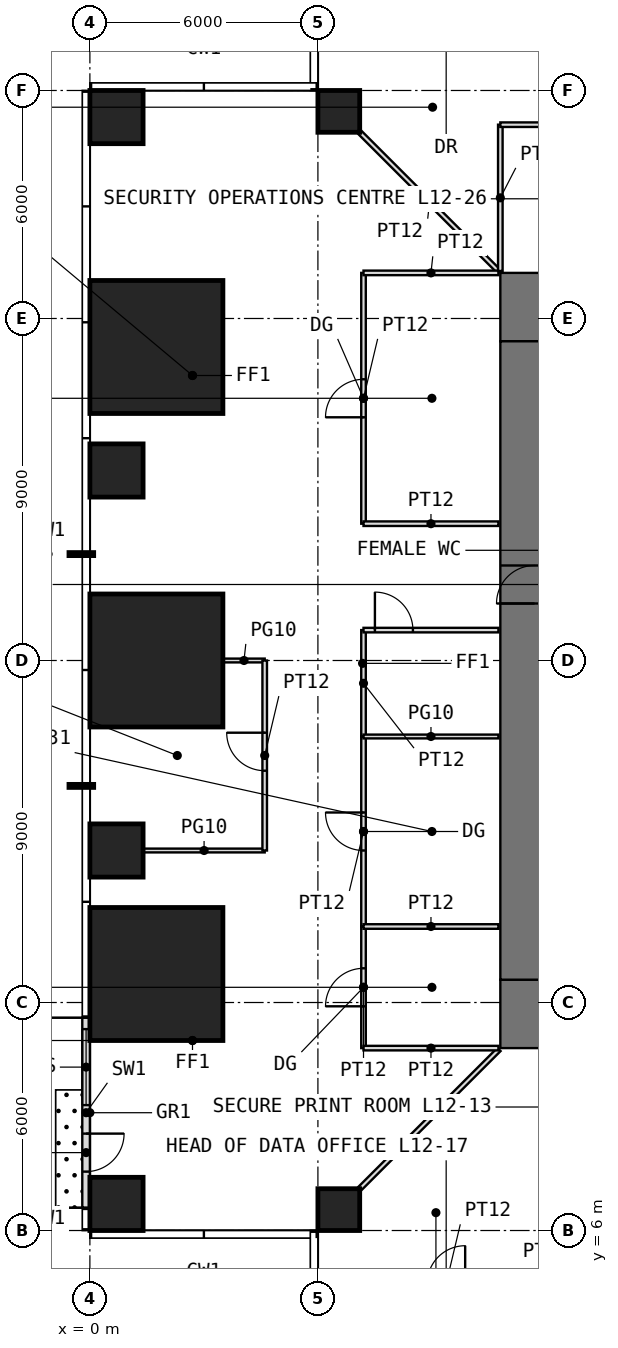
"""IFC4 building model, lengths in metres.
Left out: names, types, materials, properties, quantities, classifications, styles, units other than length and angle.
Written with IfcOpenShell. Run it as: python <this file> out.ifc"""

import sys

from ifc_helpers import new_model, si_unit, direction, frame, frame_2d, origin, origin_2d, place, context, subcontext, project, spatial, rectangle, extrude, element, fill, save


model = new_model("IFC4")
c1 = context("Model", 3, precision=1e-05, world=origin(), true_north=direction((0.0, 1.0)))
c2 = subcontext(c1, "Body", "Model", "MODEL_VIEW")
j1 = project(units=[si_unit("LENGTHUNIT", "METRE"), si_unit("PLANEANGLEUNIT", "RADIAN")], contexts=[c1])
p1 = place(None, origin())
s1 = spatial("IfcSite", under=j1, at=p1, CompositionType="ELEMENT")
p2 = place(p1, origin())
s2 = spatial("IfcBuilding", under=s1, at=p2, CompositionType="ELEMENT")
p3 = place(p2, frame((0.0, 0.0, 54.5)))
s3 = spatial("IfcBuildingStorey", under=s2, at=p3, CompositionType="ELEMENT", Elevation=54.5)
p4 = place(p3, frame((0.7, 6.7, 0.0), z_axis=(0.0, 0.0, 1.0), x_axis=(1.0, 0.0, 0.0)))
e1 = element("IfcColumn", 1, at=p4, inside=s3, PredefinedType="COLUMN", context=c2, shape_type="SweptSolid", body=[
    extrude(rectangle(XDim=1.4, YDim=1.4, at=origin_2d()), origin(), (0.0, 0.0, 1.0), 4.0),
])
p5 = place(p3, frame((6.55, 6.55, 0.0), z_axis=(0.0, 0.0, 1.0), x_axis=(1.0, 0.0, 0.0)))
e2 = element("IfcColumn", 2, at=p5, inside=s3, PredefinedType="COLUMN", context=c2, shape_type="SweptSolid", body=[
    extrude(rectangle(XDim=1.1, YDim=1.1, at=origin_2d()), origin(), (0.0, 0.0, 1.0), 4.0),
])
p6 = place(p3, frame((1.75, 12.75, 0.0), z_axis=(0.0, 0.0, 1.0), x_axis=(1.0, 0.0, 0.0)))
e3 = element("IfcColumn", 3, at=p6, inside=s3, PredefinedType="COLUMN", context=c2, shape_type="SweptSolid", body=[
    extrude(rectangle(XDim=3.5, YDim=3.5, at=origin_2d()), origin(), (0.0, 0.0, 1.0), 4.0),
])
p7 = place(p3, frame((0.7, 16.0, 0.0), z_axis=(0.0, 0.0, 1.0), x_axis=(1.0, 0.0, 0.0)))
e4 = element("IfcColumn", 4, at=p7, inside=s3, PredefinedType="COLUMN", context=c2, shape_type="SweptSolid", body=[
    extrude(rectangle(XDim=1.4, YDim=1.4, at=origin_2d()), origin(), (0.0, 0.0, 1.0), 4.0),
])
p8 = place(p3, frame((1.75, 21.0, 0.0), z_axis=(0.0, 0.0, 1.0), x_axis=(1.0, 0.0, 0.0)))
e5 = element("IfcColumn", 5, at=p8, inside=s3, PredefinedType="COLUMN", context=c2, shape_type="SweptSolid", body=[
    extrude(rectangle(XDim=3.5, YDim=3.5, at=origin_2d()), origin(), (0.0, 0.0, 1.0), 4.0),
])
p9 = place(p3, frame((0.7, 26.0, 0.0), z_axis=(0.0, 0.0, 1.0), x_axis=(1.0, 0.0, 0.0)))
e6 = element("IfcColumn", 6, at=p9, inside=s3, PredefinedType="COLUMN", context=c2, shape_type="SweptSolid", body=[
    extrude(rectangle(XDim=1.4, YDim=1.4, at=origin_2d()), origin(), (0.0, 0.0, 1.0), 4.0),
])
p10 = place(p3, frame((1.75, 29.25, 0.0), z_axis=(0.0, 0.0, 1.0), x_axis=(1.0, 0.0, 0.0)))
e7 = element("IfcColumn", 7, at=p10, inside=s3, PredefinedType="COLUMN", context=c2, shape_type="SweptSolid", body=[
    extrude(rectangle(XDim=3.5, YDim=3.5, at=origin_2d()), origin(), (0.0, 0.0, 1.0), 4.0),
])
p11 = place(p3, frame((0.7, 35.3, 0.0), z_axis=(0.0, 0.0, 1.0), x_axis=(1.0, 0.0, 0.0)))
e8 = element("IfcColumn", 8, at=p11, inside=s3, PredefinedType="COLUMN", context=c2, shape_type="SweptSolid", body=[
    extrude(rectangle(XDim=1.4, YDim=1.4, at=origin_2d()), origin(), (0.0, 0.0, 1.0), 4.0),
])
p12 = place(p3, frame((6.55, 35.45, 0.0), z_axis=(0.0, 0.0, 1.0), x_axis=(1.0, 0.0, 0.0)))
e9 = element("IfcColumn", 9, at=p12, inside=s3, PredefinedType="COLUMN", context=c2, shape_type="SweptSolid", body=[
    extrude(rectangle(XDim=1.1, YDim=1.1, at=origin_2d()), origin(), (0.0, 0.0, 1.0), 4.0),
])
p13 = place(p3, frame((-0.1, 11.6, 0.0), z_axis=(0.0, 0.0, 1.0), x_axis=(0.0, -1.0, 0.0)))
e10 = element("IfcWall", 10, at=p13, inside=s3, PredefinedType="USERDEFINED", context=c2, shape_type="SweptSolid", body=[
    extrude(rectangle(XDim=5.0, YDim=0.2, at=frame_2d((2.5, 0.0))), origin(), (0.0, 0.0, 1.0), 3.75),
])
p14 = place(p13, frame((3.05, 0.0, 0.0)))
e11 = element("IfcOpeningElement", 11, at=p14, cuts=e10, PredefinedType="OPENING", context=c2, shape_type="SweptSolid", body=[
    extrude(rectangle(XDim=1.0, YDim=2.4, at=frame_2d((0.5, 1.2))), frame((0.0, 0.11, 0.0), z_axis=(0.0, -1.0, 0.0), x_axis=(1.0, 0.0, 0.0)), (0.0, 0.0, 1.0), 0.22),
])
p15 = place(p13, frame((0.3, 0.0, 0.3)))
e12 = element("IfcOpeningElement", 12, at=p15, cuts=e10, PredefinedType="OPENING", context=c2, shape_type="SweptSolid", body=[
    extrude(rectangle(XDim=2.0, YDim=2.7, at=frame_2d((1.0, 1.35))), frame((0.0, 0.11, 0.0), z_axis=(0.0, -1.0, 0.0), x_axis=(1.0, 0.0, 0.0)), (0.0, 0.0, 1.0), 0.22),
])
p16 = place(p3, frame((10.8, 11.7, -0.05), z_axis=(0.0, 0.0, 1.0), x_axis=(1.0, 0.0, 0.0)))
e13 = element("IfcWall", 13, at=p16, inside=s3, PredefinedType="SHEAR", context=c2, shape_type="SweptSolid", body=[
    extrude(rectangle(XDim=20.4, YDim=1.8, at=frame_2d((10.2, 0.0))), origin(), (0.0, 0.0, 1.0), 4.0),
])
p17 = place(p16, frame((9.2, 0.0, 0.05)))
e14 = element("IfcOpeningElement", 14, at=p17, cuts=e13, PredefinedType="OPENING", context=c2, shape_type="SweptSolid", body=[
    extrude(rectangle(XDim=2.0, YDim=2.2, at=frame_2d((1.0, 1.1))), frame((0.0, 0.91, 0.0), z_axis=(0.0, -1.0, 0.0), x_axis=(1.0, 0.0, 0.0)), (0.0, 0.0, 1.0), 1.82),
])
p18 = place(p3, frame((10.8, 30.3, -0.05), z_axis=(0.0, 0.0, 1.0), x_axis=(1.0, 0.0, 0.0)))
e15 = element("IfcWall", 15, at=p18, inside=s3, PredefinedType="SHEAR", context=c2, shape_type="SweptSolid", body=[
    extrude(rectangle(XDim=20.4, YDim=1.8, at=frame_2d((10.2, 0.0))), origin(), (0.0, 0.0, 1.0), 4.0),
])
p19 = place(p18, frame((9.2, 0.0, 0.05)))
e16 = element("IfcOpeningElement", 16, at=p19, cuts=e15, PredefinedType="OPENING", context=c2, shape_type="SweptSolid", body=[
    extrude(rectangle(XDim=2.0, YDim=2.2, at=frame_2d((1.0, 1.1))), frame((0.0, 0.91, 0.0), z_axis=(0.0, -1.0, 0.0), x_axis=(1.0, 0.0, 0.0)), (0.0, 0.0, 1.0), 1.82),
])
p20 = place(p3, frame((11.7, 12.6, -0.05), z_axis=(0.0, 0.0, 1.0), x_axis=(0.0, 1.0, 0.0)))
e17 = element("IfcWall", 17, at=p20, inside=s3, PredefinedType="SHEAR", context=c2, shape_type="SweptSolid", body=[
    extrude(rectangle(XDim=16.8, YDim=1.8, at=frame_2d((8.4, 0.0))), origin(), (0.0, 0.0, 1.0), 4.0),
])
p21 = place(p20, frame((9.9, 0.0, 0.05)))
e18 = element("IfcOpeningElement", 18, at=p21, cuts=e17, PredefinedType="OPENING", context=c2, shape_type="SweptSolid", body=[
    extrude(rectangle(XDim=1.0, YDim=2.2, at=frame_2d((0.5, 1.1))), frame((0.0, 0.91, 0.0), z_axis=(0.0, -1.0, 0.0), x_axis=(1.0, 0.0, 0.0)), (0.0, 0.0, 1.0), 1.82),
])
p22 = place(p3, frame((1.41, 16.0, 0.0), z_axis=(0.0, 0.0, 1.0), x_axis=(1.0, 0.0, 0.0)))
e19 = element("IfcWall", 19, at=p22, inside=s3, PredefinedType="PARTITIONING", context=c2, shape_type="SweptSolid", body=[
    extrude(rectangle(XDim=3.19, YDim=0.1, at=frame_2d((1.595, 0.0))), origin(), (0.0, 0.0, 1.0), 3.75),
])
p23 = place(p3, frame((3.51, 21.0, 0.0), z_axis=(0.0, 0.0, 1.0), x_axis=(1.0, 0.0, 0.0)))
e20 = element("IfcWall", 20, at=p23, inside=s3, PredefinedType="PARTITIONING", context=c2, shape_type="SweptSolid", body=[
    extrude(rectangle(XDim=1.09, YDim=0.1, at=frame_2d((0.545, 0.0))), origin(), (0.0, 0.0, 1.0), 3.75),
])
p24 = place(p3, frame((4.6, 16.0, 0.0), z_axis=(0.0, 0.0, 1.0), x_axis=(0.0, 1.0, 0.0)))
e21 = element("IfcWall", 21, at=p24, inside=s3, PredefinedType="PARTITIONING", context=c2, shape_type="SweptSolid", body=[
    extrude(rectangle(XDim=5.0, YDim=0.12, at=frame_2d((2.5, 0.0))), origin(), (0.0, 0.0, 1.0), 3.75),
])
p25 = place(p24, frame((2.1, 0.0, 0.0)))
e22 = element("IfcOpeningElement", 22, at=p25, cuts=e21, PredefinedType="OPENING", context=c2, shape_type="SweptSolid", body=[
    extrude(rectangle(XDim=1.0, YDim=2.4, at=frame_2d((0.5, 1.2))), frame((0.0, 0.07, 0.0), z_axis=(0.0, -1.0, 0.0), x_axis=(1.0, 0.0, 0.0)), (0.0, 0.0, 1.0), 0.14),
])
for number, where, z_axis, x_axis in (
    (23, (7.11, 7.11, 0.0), (0.0, 0.0, 1.0), (0.707, 0.707, 0.0)),
    (24, (7.11, 34.89, 0.0), (0.0, 0.0, 1.0), (0.707, -0.707, 0.0)),
):
    element("IfcWall", number, at=place(p3, frame(where, z_axis=z_axis, x_axis=x_axis)), inside=s3, PredefinedType="PARTITIONING", context=c2, shape_type="SweptSolid", body=[
        extrude(rectangle(XDim=5.168, YDim=0.12, at=frame_2d((2.584, 0.0))), origin(), (0.0, 0.0, 1.0), 3.75),
    ])
p26 = place(p3, frame((7.2, 10.8, 0.0), z_axis=(0.0, 0.0, 1.0), x_axis=(0.0, 1.0, 0.0)))
e25 = element("IfcWall", 25, at=p26, inside=s3, PredefinedType="PARTITIONING", context=c2, shape_type="SweptSolid", body=[
    extrude(rectangle(XDim=3.2, YDim=0.12, at=frame_2d((1.6, 0.0))), origin(), (0.0, 0.0, 1.0), 3.75),
])
p27 = place(p26, frame((1.1, 0.0, 0.0)))
e26 = element("IfcOpeningElement", 26, at=p27, cuts=e25, PredefinedType="OPENING", context=c2, shape_type="SweptSolid", body=[
    extrude(rectangle(XDim=1.0, YDim=2.4, at=frame_2d((0.5, 1.2))), frame((0.0, 0.07, 0.0), z_axis=(0.0, -1.0, 0.0), x_axis=(1.0, 0.0, 0.0)), (0.0, 0.0, 1.0), 0.14),
])
p28 = place(p3, frame((7.2, 10.8, 0.0), z_axis=(0.0, 0.0, 1.0), x_axis=(1.0, 0.0, 0.0)))
e27 = element("IfcWall", 27, at=p28, inside=s3, PredefinedType="PARTITIONING", context=c2, shape_type="SweptSolid", body=[
    extrude(rectangle(XDim=3.55, YDim=0.12, at=frame_2d((1.775, 0.0))), origin(), (0.0, 0.0, 1.0), 3.75),
])
p29 = place(p3, frame((7.2, 14.0, 0.0), z_axis=(0.0, 0.0, 1.0), x_axis=(0.0, 1.0, 0.0)))
e28 = element("IfcWall", 28, at=p29, inside=s3, PredefinedType="PARTITIONING", context=c2, shape_type="SweptSolid", body=[
    extrude(rectangle(XDim=5.0, YDim=0.12, at=frame_2d((2.5, 0.0))), origin(), (0.0, 0.0, 1.0), 3.75),
])
p30 = place(p29, frame((2.0, 0.0, 0.0)))
e29 = element("IfcOpeningElement", 29, at=p30, cuts=e28, PredefinedType="OPENING", context=c2, shape_type="SweptSolid", body=[
    extrude(rectangle(XDim=1.0, YDim=2.4, at=frame_2d((0.5, 1.2))), frame((0.0, 0.07, 0.0), z_axis=(0.0, -1.0, 0.0), x_axis=(1.0, 0.0, 0.0)), (0.0, 0.0, 1.0), 0.14),
])
p31 = place(p3, frame((7.2, 14.0, 0.0), z_axis=(0.0, 0.0, 1.0), x_axis=(1.0, 0.0, 0.0)))
e30 = element("IfcWall", 30, at=p31, inside=s3, PredefinedType="PARTITIONING", context=c2, shape_type="SweptSolid", body=[
    extrude(rectangle(XDim=3.55, YDim=0.12, at=frame_2d((1.775, 0.0))), origin(), (0.0, 0.0, 1.0), 3.75),
])
p32 = place(p3, frame((7.2, 19.0, 0.0), z_axis=(0.0, 0.0, 1.0), x_axis=(0.0, 1.0, 0.0)))
e31 = element("IfcWall", 31, at=p32, inside=s3, PredefinedType="PARTITIONING", context=c2, shape_type="SweptSolid", body=[
    extrude(rectangle(XDim=2.8, YDim=0.12, at=frame_2d((1.4, 0.0))), origin(), (0.0, 0.0, 1.0), 3.75),
])
p33 = place(p3, frame((7.2, 19.0, 0.0), z_axis=(0.0, 0.0, 1.0), x_axis=(1.0, 0.0, 0.0)))
e32 = element("IfcWall", 32, at=p33, inside=s3, PredefinedType="PARTITIONING", context=c2, shape_type="SweptSolid", body=[
    extrude(rectangle(XDim=3.55, YDim=0.1, at=frame_2d((1.775, 0.0))), origin(), (0.0, 0.0, 1.0), 3.75),
])
p34 = place(p3, frame((7.2, 21.8, 0.0), z_axis=(0.0, 0.0, 1.0), x_axis=(1.0, 0.0, 0.0)))
e33 = element("IfcWall", 33, at=p34, inside=s3, PredefinedType="PARTITIONING", context=c2, shape_type="SweptSolid", body=[
    extrude(rectangle(XDim=3.55, YDim=0.12, at=frame_2d((1.775, 0.0))), origin(), (0.0, 0.0, 1.0), 3.75),
])
p35 = place(p34, frame((0.3, 0.0, 0.0)))
e34 = element("IfcOpeningElement", 34, at=p35, cuts=e33, PredefinedType="OPENING", context=c2, shape_type="SweptSolid", body=[
    extrude(rectangle(XDim=1.0, YDim=2.4, at=frame_2d((0.5, 1.2))), frame((0.0, 0.07, 0.0), z_axis=(0.0, -1.0, 0.0), x_axis=(1.0, 0.0, 0.0)), (0.0, 0.0, 1.0), 0.14),
])
p36 = place(p3, frame((7.2, 24.6, 0.0), z_axis=(0.0, 0.0, 1.0), x_axis=(0.0, 1.0, 0.0)))
e35 = element("IfcWall", 35, at=p36, inside=s3, PredefinedType="PARTITIONING", context=c2, shape_type="SweptSolid", body=[
    extrude(rectangle(XDim=6.6, YDim=0.12, at=frame_2d((3.3, 0.0))), origin(), (0.0, 0.0, 1.0), 3.75),
])
p37 = place(p36, frame((2.8, 0.0, 0.0)))
e36 = element("IfcOpeningElement", 36, at=p37, cuts=e35, PredefinedType="OPENING", context=c2, shape_type="SweptSolid", body=[
    extrude(rectangle(XDim=1.0, YDim=2.4, at=frame_2d((0.5, 1.2))), frame((0.0, 0.07, 0.0), z_axis=(0.0, -1.0, 0.0), x_axis=(1.0, 0.0, 0.0)), (0.0, 0.0, 1.0), 0.14),
])
for number, where, z_axis, x_axis in (
    (37, (7.2, 24.6, 0.0), (0.0, 0.0, 1.0), (1.0, 0.0, 0.0)),
    (38, (7.2, 31.2, 0.0), (0.0, 0.0, 1.0), (1.0, 0.0, 0.0)),
):
    element("IfcWall", number, at=place(p3, frame(where, z_axis=z_axis, x_axis=x_axis)), inside=s3, PredefinedType="PARTITIONING", context=c2, shape_type="SweptSolid", body=[
        extrude(rectangle(XDim=3.55, YDim=0.12, at=frame_2d((1.775, 0.0))), origin(), (0.0, 0.0, 1.0), 3.75),
    ])
p38 = place(p3, frame((10.8, 31.25, 0.0), z_axis=(0.0, 0.0, 1.0), x_axis=(0.0, 1.0, 0.0)))
e39 = element("IfcWall", 39, at=p38, inside=s3, PredefinedType="PARTITIONING", context=c2, shape_type="SweptSolid", body=[
    extrude(rectangle(XDim=3.85, YDim=0.12, at=frame_2d((1.925, 0.0))), origin(), (0.0, 0.0, 1.0), 3.75),
])
p39 = place(p3, frame((10.8, 35.1, 0.0), z_axis=(0.0, 0.0, 1.0), x_axis=(1.0, 0.0, 0.0)))
e40 = element("IfcWall", 40, at=p39, inside=s3, PredefinedType="PARTITIONING", context=c2, shape_type="SweptSolid", body=[
    extrude(rectangle(XDim=7.6, YDim=0.12, at=frame_2d((3.8, 0.0))), origin(), (0.0, 0.0, 1.0), 3.75),
])
p40 = place(p39, frame((3.3, 0.0, 0.0)))
e41 = element("IfcOpeningElement", 41, at=p40, cuts=e40, PredefinedType="OPENING", context=c2, shape_type="SweptSolid", body=[
    extrude(rectangle(XDim=1.0, YDim=2.2, at=frame_2d((0.5, 1.1))), frame((0.0, 0.07, 0.0), z_axis=(0.0, -1.0, 0.0), x_axis=(1.0, 0.0, 0.0)), (0.0, 0.0, 1.0), 0.14),
])
p41 = place(p14, origin())
e42 = element("IfcDoor", 42, at=p41, inside=s3, OperationType="SINGLE_SWING_LEFT", PredefinedType="DOOR", context=c2, shape_type="SweptSolid", body=[
    extrude(rectangle(XDim=1.0, YDim=2.4, at=frame_2d((0.5, 1.2))), frame((0.0, 0.025, 0.0), z_axis=(0.0, -1.0, 0.0), x_axis=(1.0, 0.0, 0.0)), (0.0, 0.0, 1.0), 0.05),
])
fill(e11, e42)
p42 = place(p15, origin())
e43 = element("IfcWindow", 43, at=p42, inside=s3, PartitioningType="SINGLE_PANEL", PredefinedType="WINDOW", context=c2, shape_type="SweptSolid", body=[
    extrude(rectangle(XDim=2.0, YDim=2.7, at=frame_2d((1.0, 1.35))), frame((0.0, 0.03, 0.0), z_axis=(0.0, -1.0, 0.0), x_axis=(1.0, 0.0, 0.0)), (0.0, 0.0, 1.0), 0.06),
])
fill(e12, e43)
p43 = place(p21, origin())
e44 = element("IfcDoor", 44, at=p43, inside=s3, OperationType="SINGLE_SWING_LEFT", PredefinedType="DOOR", context=c2, shape_type="SweptSolid", body=[
    extrude(rectangle(XDim=1.0, YDim=2.2, at=frame_2d((0.5, 1.1))), frame((0.0, 0.025, 0.0), z_axis=(0.0, -1.0, 0.0), x_axis=(1.0, 0.0, 0.0)), (0.0, 0.0, 1.0), 0.05),
])
fill(e18, e44)
p44 = place(p27, origin())
e45 = element("IfcDoor", 45, at=p44, inside=s3, OperationType="SINGLE_SWING_LEFT", PredefinedType="DOOR", context=c2, shape_type="SweptSolid", body=[
    extrude(rectangle(XDim=1.0, YDim=2.4, at=frame_2d((0.5, 1.2))), frame((0.0, 0.025, 0.0), z_axis=(0.0, -1.0, 0.0), x_axis=(1.0, 0.0, 0.0)), (0.0, 0.0, 1.0), 0.05),
])
fill(e26, e45)
p45 = place(p30, origin())
e46 = element("IfcDoor", 46, at=p45, inside=s3, OperationType="SINGLE_SWING_RIGHT", PredefinedType="DOOR", context=c2, shape_type="SweptSolid", body=[
    extrude(rectangle(XDim=1.0, YDim=2.4, at=frame_2d((0.5, 1.2))), frame((0.0, 0.025, 0.0), z_axis=(0.0, -1.0, 0.0), x_axis=(1.0, 0.0, 0.0)), (0.0, 0.0, 1.0), 0.05),
])
fill(e29, e46)
p46 = place(p37, origin())
e47 = element("IfcDoor", 47, at=p46, inside=s3, OperationType="SINGLE_SWING_LEFT", PredefinedType="DOOR", context=c2, shape_type="SweptSolid", body=[
    extrude(rectangle(XDim=1.0, YDim=2.4, at=frame_2d((0.5, 1.2))), frame((0.0, 0.025, 0.0), z_axis=(0.0, -1.0, 0.0), x_axis=(1.0, 0.0, 0.0)), (0.0, 0.0, 1.0), 0.05),
])
fill(e36, e47)
p47 = place(p25, origin())
e48 = element("IfcDoor", 48, at=p47, inside=s3, OperationType="SINGLE_SWING_RIGHT", PredefinedType="DOOR", context=c2, shape_type="SweptSolid", body=[
    extrude(rectangle(XDim=1.0, YDim=2.4, at=frame_2d((0.5, 1.2))), frame((0.0, 0.025, 0.0), z_axis=(0.0, -1.0, 0.0), x_axis=(1.0, 0.0, 0.0)), (0.0, 0.0, 1.0), 0.05),
])
fill(e22, e48)
p48 = place(p35, origin())
e49 = element("IfcDoor", 49, at=p48, inside=s3, OperationType="SINGLE_SWING_LEFT", PredefinedType="DOOR", context=c2, shape_type="SweptSolid", body=[
    extrude(rectangle(XDim=1.0, YDim=2.4, at=frame_2d((0.5, 1.2))), frame((0.0, 0.025, 0.0), z_axis=(0.0, -1.0, 0.0), x_axis=(1.0, 0.0, 0.0)), (0.0, 0.0, 1.0), 0.05),
])
fill(e34, e49)
save(model, sys.argv[1])
